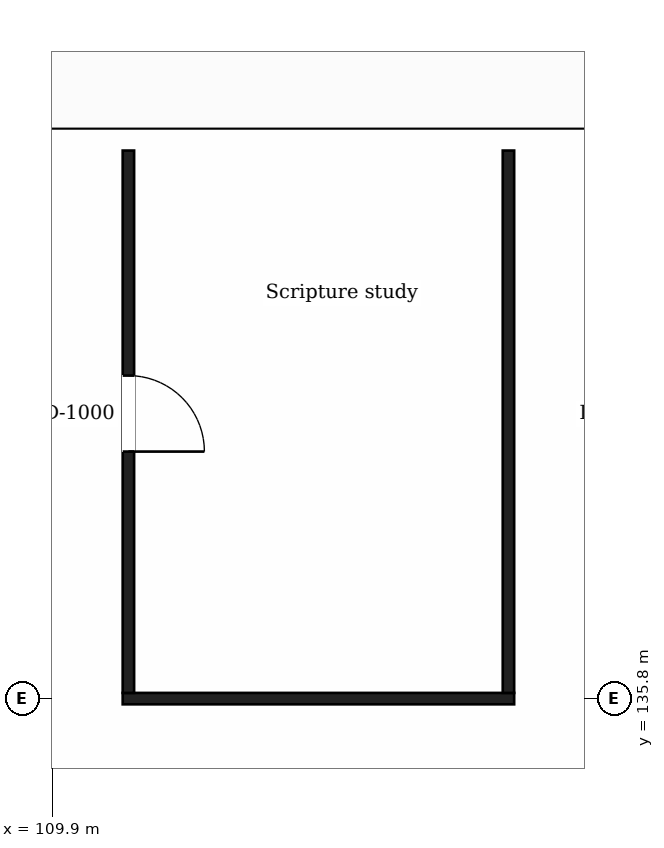
"""IFC4 building model, lengths in metres.
Left out: names, types, materials, properties, quantities, classifications, styles, units other than length and angle.
Written with IfcOpenShell. Run it as: python <this file> out.ifc"""

import sys

from ifc_helpers import new_model, si_unit, direction, frame, frame_2d, origin, place, context, subcontext, project, spatial, rectangle, extrude, element, fill, save


model = new_model("IFC4")
c1 = context("Model", 3, precision=1e-05, world=origin(), true_north=direction((0.0, 1.0)))
c2 = subcontext(c1, "Body", "Model", "MODEL_VIEW")
j1 = project(units=[si_unit("LENGTHUNIT", "METRE"), si_unit("PLANEANGLEUNIT", "RADIAN")], contexts=[c1])
p1 = place(None, origin())
s1 = spatial("IfcSite", under=j1, at=p1, CompositionType="ELEMENT")
p2 = place(p1, origin())
s2 = spatial("IfcBuilding", under=s1, at=p2, CompositionType="ELEMENT")
p3 = place(p2, frame((0.0, 0.0, 135.4)))
s3 = spatial("IfcBuildingStorey", under=s2, at=p3, CompositionType="ELEMENT", Elevation=135.4)
p4 = place(p3, frame((110.825, 135.8, 0.0), z_axis=(0.0, 0.0, 1.0), x_axis=(1.0, 0.0, 0.0)))
e1 = element("IfcWall", 1, at=p4, inside=s3, PredefinedType="PARTITIONING", context=c2, shape_type="SweptSolid", body=[
    extrude(rectangle(XDim=5.15, YDim=0.15, at=frame_2d((2.575, 0.0))), origin(), (0.0, 0.0, 1.0), 6.9),
])
p5 = place(p3, frame((110.9, 135.875, 0.0), z_axis=(0.0, 0.0, 1.0), x_axis=(0.0, 1.0, 0.0)))
e2 = element("IfcWall", 2, at=p5, inside=s3, PredefinedType="PARTITIONING", context=c2, shape_type="SweptSolid", body=[
    extrude(rectangle(XDim=7.135, YDim=0.15, at=frame_2d((3.567, 0.0))), origin(), (0.0, 0.0, 1.0), 6.9),
])
p6 = place(p5, frame((3.175, 0.0, 0.0)))
e3 = element("IfcOpeningElement", 3, at=p6, cuts=e2, PredefinedType="OPENING", context=c2, shape_type="SweptSolid", body=[
    extrude(rectangle(XDim=1.0, YDim=2.1, at=frame_2d((0.5, 1.05))), frame((0.0, 0.085, 0.0), z_axis=(0.0, -1.0, 0.0), x_axis=(1.0, 0.0, 0.0)), (0.0, 0.0, 1.0), 0.17),
])
p7 = place(p3, frame((115.9, 135.875, 0.0), z_axis=(0.0, 0.0, 1.0), x_axis=(0.0, 1.0, 0.0)))
e4 = element("IfcWall", 4, at=p7, inside=s3, PredefinedType="PARTITIONING", context=c2, shape_type="SweptSolid", body=[
    extrude(rectangle(XDim=7.135, YDim=0.15, at=frame_2d((3.567, 0.0))), origin(), (0.0, 0.0, 1.0), 6.9),
])
p8 = place(p6, origin())
e5 = element("IfcDoor", 5, at=p8, inside=s3, OperationType="SINGLE_SWING_LEFT", PredefinedType="DOOR", context=c2, shape_type="SweptSolid", body=[
    extrude(rectangle(XDim=1.0, YDim=2.1, at=frame_2d((0.5, 1.05))), frame((0.0, 0.025, 0.0), z_axis=(0.0, -1.0, 0.0), x_axis=(1.0, 0.0, 0.0)), (0.0, 0.0, 1.0), 0.05),
])
fill(e3, e5)
save(model, sys.argv[1])
